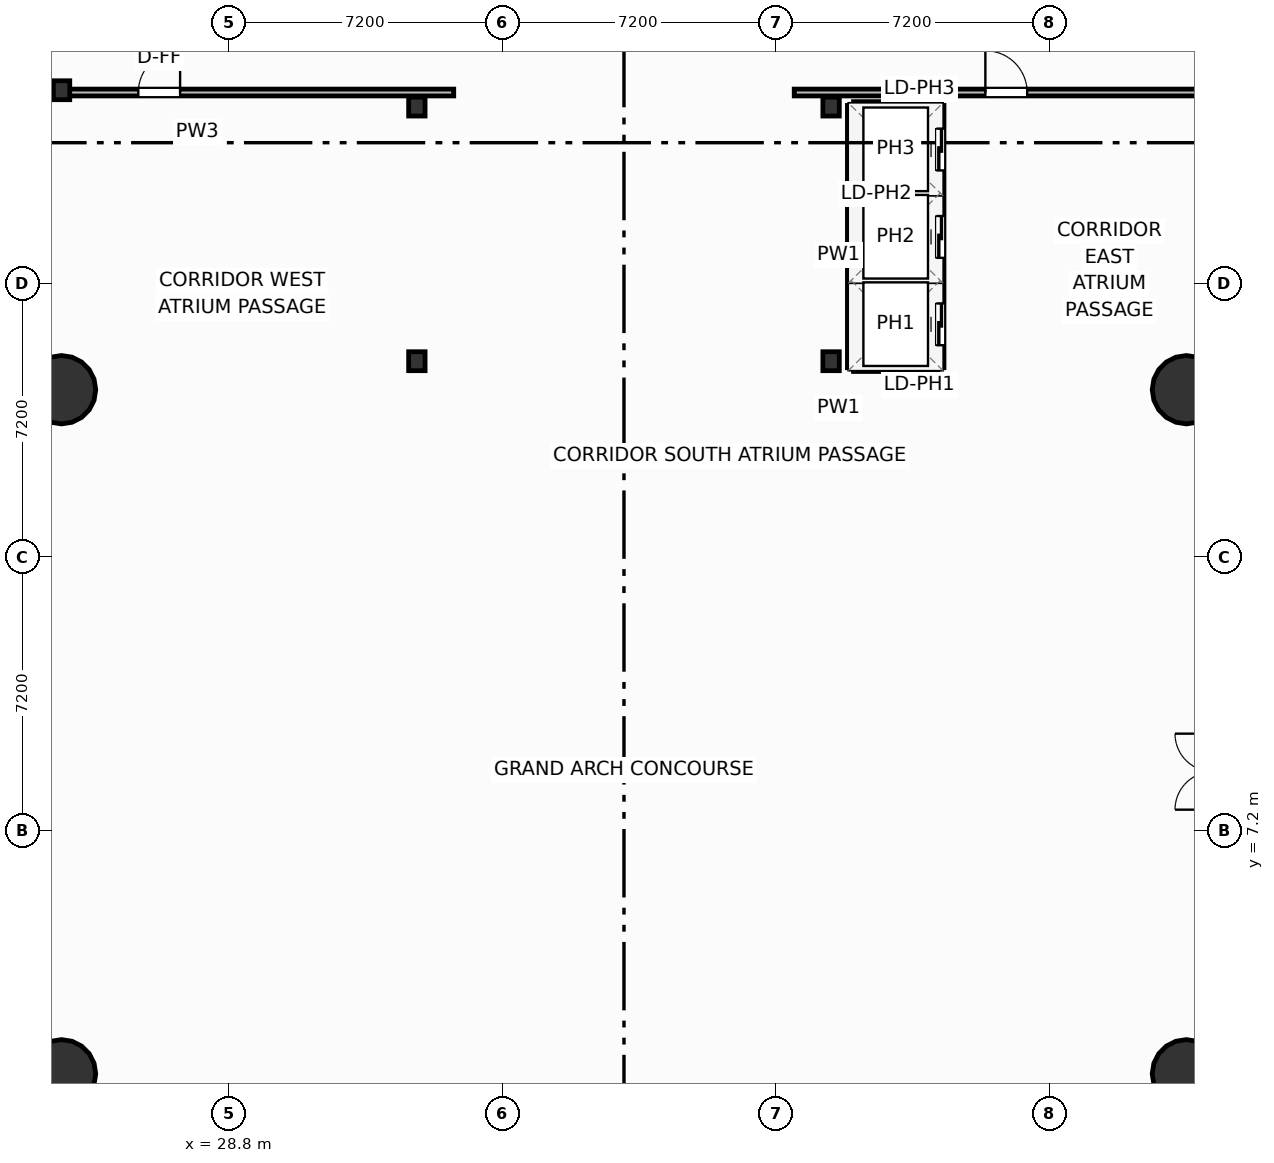
"""IFC4 building model, lengths in metres.
Left out: names, types, materials, properties, quantities, classifications, styles, units other than length and angle.
Written with IfcOpenShell. Run it as: python <this file> out.ifc"""

import sys

from ifc_helpers import new_model, si_unit, direction, frame, frame_2d, origin, origin_2d, place, context, subcontext, project, spatial, rectangle, circle, i_section, extrude, element, fill, save


model = new_model("IFC4")
c1 = context("Model", 3, precision=1e-05, world=origin(), true_north=direction((0.0, 1.0)))
c2 = subcontext(c1, "Body", "Model", "MODEL_VIEW")
j1 = project(units=[si_unit("LENGTHUNIT", "METRE"), si_unit("PLANEANGLEUNIT", "RADIAN")], contexts=[c1])
p1 = place(None, origin())
s1 = spatial("IfcSite", under=j1, at=p1, CompositionType="ELEMENT")
p2 = place(p1, origin())
s2 = spatial("IfcBuilding", under=s1, at=p2, CompositionType="ELEMENT")
p3 = place(p2, origin())
s3 = spatial("IfcBuildingStorey", under=s2, at=p3, CompositionType="ELEMENT", Elevation=0.0)
for number, where, z_axis, x_axis in (
    (1, (33.75, 19.55, 0.0), (0.0, 0.0, 1.0), (1.0, 0.0, 0.0)),
    (2, (44.65, 19.55, 0.0), (0.0, 0.0, 1.0), (1.0, 0.0, 0.0)),
    (3, (33.75, 26.25, 0.0), (0.0, 0.0, 1.0), (1.0, 0.0, 0.0)),
    (4, (44.65, 26.25, 0.0), (0.0, 0.0, 1.0), (1.0, 0.0, 0.0)),
    (5, (24.4, 26.68, 0.0), (0.0, 0.0, 1.0), (1.0, 0.0, 0.0)),
):
    element("IfcColumn", number, at=place(p3, frame(where, z_axis=z_axis, x_axis=x_axis)), inside=s3, PredefinedType="COLUMN", context=c2, shape_type="SweptSolid", body=[
        extrude(i_section(OverallWidth=0.432, OverallDepth=0.498, WebThickness=0.056, FlangeThickness=0.089, FilletRadius=0.025, at=origin_2d()), origin(), (0.0, 0.0, 1.0), 5.4),
    ])
for number, where, z_axis, x_axis in (
    (6, (24.4, 0.8, 0.0), (0.0, 0.0, 1.0), (1.0, 0.0, 0.0)),
    (7, (54.0, 0.8, 0.0), (0.0, 0.0, 1.0), (1.0, 0.0, 0.0)),
    (8, (24.4, 18.8, 0.0), (0.0, 0.0, 1.0), (1.0, 0.0, 0.0)),
    (9, (54.0, 18.8, 0.0), (0.0, 0.0, 1.0), (1.0, 0.0, 0.0)),
):
    element("IfcColumn", number, at=place(p3, frame(where, z_axis=z_axis, x_axis=x_axis)), inside=s3, PredefinedType="COLUMN", context=c2, shape_type="SweptSolid", body=[
        extrude(circle(Radius=0.9, at=origin_2d()), origin(), (0.0, 0.0, 1.0), 5.4),
    ])
p4 = place(p3, frame((21.22, 26.62, 0.0), z_axis=(0.0, 0.0, 1.0), x_axis=(1.0, 0.0, 0.0)))
e10 = element("IfcWall", 10, at=p4, inside=s3, PredefinedType="PARTITIONING", context=c2, shape_type="SweptSolid", body=[
    extrude(rectangle(XDim=13.5, YDim=0.18, at=frame_2d((6.75, 0.0))), origin(), (0.0, 0.0, 1.0), 4.332),
])
p5 = place(p4, frame((5.2, 0.0, 0.0)))
e11 = element("IfcOpeningElement", 11, at=p5, cuts=e10, PredefinedType="OPENING", context=c2, shape_type="SweptSolid", body=[
    extrude(rectangle(XDim=1.1, YDim=2.15, at=frame_2d((0.55, 1.075))), frame((0.0, 0.1, 0.0), z_axis=(0.0, -1.0, 0.0), x_axis=(1.0, 0.0, 0.0)), (0.0, 0.0, 1.0), 0.2),
])
p6 = place(p3, frame((43.68, 26.62, 0.0), z_axis=(0.0, 0.0, 1.0), x_axis=(1.0, 0.0, 0.0)))
e12 = element("IfcWall", 12, at=p6, inside=s3, PredefinedType="PARTITIONING", context=c2, shape_type="SweptSolid", body=[
    extrude(rectangle(XDim=10.98, YDim=0.18, at=frame_2d((5.49, 0.0))), origin(), (0.0, 0.0, 1.0), 5.12),
])
p7 = place(p6, frame((5.03, 0.0, 0.0)))
e13 = element("IfcOpeningElement", 13, at=p7, cuts=e12, PredefinedType="OPENING", context=c2, shape_type="SweptSolid", body=[
    extrude(rectangle(XDim=1.1, YDim=2.15, at=frame_2d((0.55, 1.075))), frame((0.0, 0.1, 0.0), z_axis=(0.0, -1.0, 0.0), x_axis=(1.0, 0.0, 0.0)), (0.0, 0.0, 1.0), 0.2),
])
for number, where, z_axis, x_axis in (
    (14, (45.24, 21.675, 0.0), (0.0, 0.0, 1.0), (1.0, 0.0, 0.0)),
    (15, (45.24, 23.975, 0.0), (0.0, 0.0, 1.0), (1.0, 0.0, 0.0)),
):
    element("IfcWall", number, at=place(p3, frame(where, z_axis=z_axis, x_axis=x_axis)), inside=s3, PredefinedType="PARTITIONING", context=c2, shape_type="SweptSolid", body=[
        extrude(rectangle(XDim=2.22, YDim=0.2, at=frame_2d((1.11, 0.0))), origin(), (0.0, 0.0, 1.0), 5.12),
    ])
p8 = place(p3, frame((45.24, 19.38, 0.0), z_axis=(0.0, 0.0, 1.0), x_axis=(1.0, 0.0, 0.0)))
e16 = element("IfcWall", 16, at=p8, inside=s3, PredefinedType="PARTITIONING", context=c2, shape_type="SweptSolid", body=[
    extrude(rectangle(XDim=2.22, YDim=0.2, at=frame_2d((1.11, 0.0))), origin(), (0.0, 0.0, 1.0), 4.332),
])
p9 = place(p3, frame((45.24, 26.28, 0.0), z_axis=(0.0, 0.0, 1.0), x_axis=(1.0, 0.0, 0.0)))
e17 = element("IfcWall", 17, at=p9, inside=s3, PredefinedType="PARTITIONING", context=c2, shape_type="SweptSolid", body=[
    extrude(rectangle(XDim=2.22, YDim=0.2, at=frame_2d((1.11, 0.0))), origin(), (0.0, 0.0, 1.0), 5.12),
])
p10 = place(p3, frame((45.18, 19.38, 0.0), z_axis=(0.0, 0.0, 1.0), x_axis=(0.0, 1.0, 0.0)))
e18 = element("IfcWall", 18, at=p10, inside=s3, PredefinedType="PARTITIONING", context=c2, shape_type="SweptSolid", body=[
    extrude(rectangle(XDim=6.9, YDim=0.2, at=frame_2d((3.45, 0.0))), origin(), (0.0, 0.0, 1.0), 5.12),
])
p11 = place(p3, frame((47.52, 19.38, 0.0), z_axis=(0.0, 0.0, 1.0), x_axis=(0.0, 1.0, 0.0)))
e19 = element("IfcWall", 19, at=p11, inside=s3, PredefinedType="PARTITIONING", context=c2, shape_type="SweptSolid", body=[
    extrude(rectangle(XDim=6.9, YDim=0.2, at=frame_2d((3.45, 0.0))), origin(), (0.0, 0.0, 1.0), 5.12),
])
p12 = place(p11, frame((0.59, 0.0, 0.0)))
e20 = element("IfcOpeningElement", 20, at=p12, cuts=e19, PredefinedType="OPENING", context=c2, shape_type="SweptSolid", body=[
    extrude(rectangle(XDim=1.1, YDim=2.15, at=frame_2d((0.55, 1.075))), frame((0.0, 0.11, 0.0), z_axis=(0.0, -1.0, 0.0), x_axis=(1.0, 0.0, 0.0)), (0.0, 0.0, 1.0), 0.22),
])
p13 = place(p11, frame((2.89, 0.0, 0.0)))
e21 = element("IfcOpeningElement", 21, at=p13, cuts=e19, PredefinedType="OPENING", context=c2, shape_type="SweptSolid", body=[
    extrude(rectangle(XDim=1.1, YDim=2.15, at=frame_2d((0.55, 1.075))), frame((0.0, 0.11, 0.0), z_axis=(0.0, -1.0, 0.0), x_axis=(1.0, 0.0, 0.0)), (0.0, 0.0, 1.0), 0.22),
])
p14 = place(p11, frame((5.19, 0.0, 0.0)))
e22 = element("IfcOpeningElement", 22, at=p14, cuts=e19, PredefinedType="OPENING", context=c2, shape_type="SweptSolid", body=[
    extrude(rectangle(XDim=1.1, YDim=2.15, at=frame_2d((0.55, 1.075))), frame((0.0, 0.11, 0.0), z_axis=(0.0, -1.0, 0.0), x_axis=(1.0, 0.0, 0.0)), (0.0, 0.0, 1.0), 0.22),
])
p15 = place(p5, origin())
e23 = element("IfcDoor", 23, at=p15, inside=s3, OperationType="SINGLE_SWING_RIGHT", PredefinedType="DOOR", context=c2, shape_type="SweptSolid", body=[
    extrude(rectangle(XDim=1.1, YDim=2.15, at=frame_2d((0.55, 1.075))), frame((0.0, 0.025, 0.0), z_axis=(0.0, -1.0, 0.0), x_axis=(1.0, 0.0, 0.0)), (0.0, 0.0, 1.0), 0.05),
])
fill(e11, e23)
p16 = place(p7, origin())
e24 = element("IfcDoor", 24, at=p16, inside=s3, OperationType="SINGLE_SWING_LEFT", PredefinedType="DOOR", context=c2, shape_type="SweptSolid", body=[
    extrude(rectangle(XDim=1.1, YDim=2.15, at=frame_2d((0.55, 1.075))), frame((0.0, 0.025, 0.0), z_axis=(0.0, -1.0, 0.0), x_axis=(1.0, 0.0, 0.0)), (0.0, 0.0, 1.0), 0.05),
])
fill(e13, e24)
p17 = place(p12, origin())
e25 = element("IfcDoor", 25, at=p17, inside=s3, OperationType="SLIDING_TO_LEFT", PredefinedType="DOOR", context=c2, shape_type="SweptSolid", body=[
    extrude(rectangle(XDim=1.1, YDim=2.15, at=frame_2d((0.55, 1.075))), frame((0.0, 0.025, 0.0), z_axis=(0.0, -1.0, 0.0), x_axis=(1.0, 0.0, 0.0)), (0.0, 0.0, 1.0), 0.05),
])
fill(e20, e25)
p18 = place(p13, origin())
e26 = element("IfcDoor", 26, at=p18, inside=s3, OperationType="SLIDING_TO_LEFT", PredefinedType="DOOR", context=c2, shape_type="SweptSolid", body=[
    extrude(rectangle(XDim=1.1, YDim=2.15, at=frame_2d((0.55, 1.075))), frame((0.0, 0.025, 0.0), z_axis=(0.0, -1.0, 0.0), x_axis=(1.0, 0.0, 0.0)), (0.0, 0.0, 1.0), 0.05),
])
fill(e21, e26)
p19 = place(p14, origin())
e27 = element("IfcDoor", 27, at=p19, inside=s3, OperationType="SLIDING_TO_LEFT", PredefinedType="DOOR", context=c2, shape_type="SweptSolid", body=[
    extrude(rectangle(XDim=1.1, YDim=2.15, at=frame_2d((0.55, 1.075))), frame((0.0, 0.025, 0.0), z_axis=(0.0, -1.0, 0.0), x_axis=(1.0, 0.0, 0.0)), (0.0, 0.0, 1.0), 0.05),
])
fill(e22, e27)
save(model, sys.argv[1])
